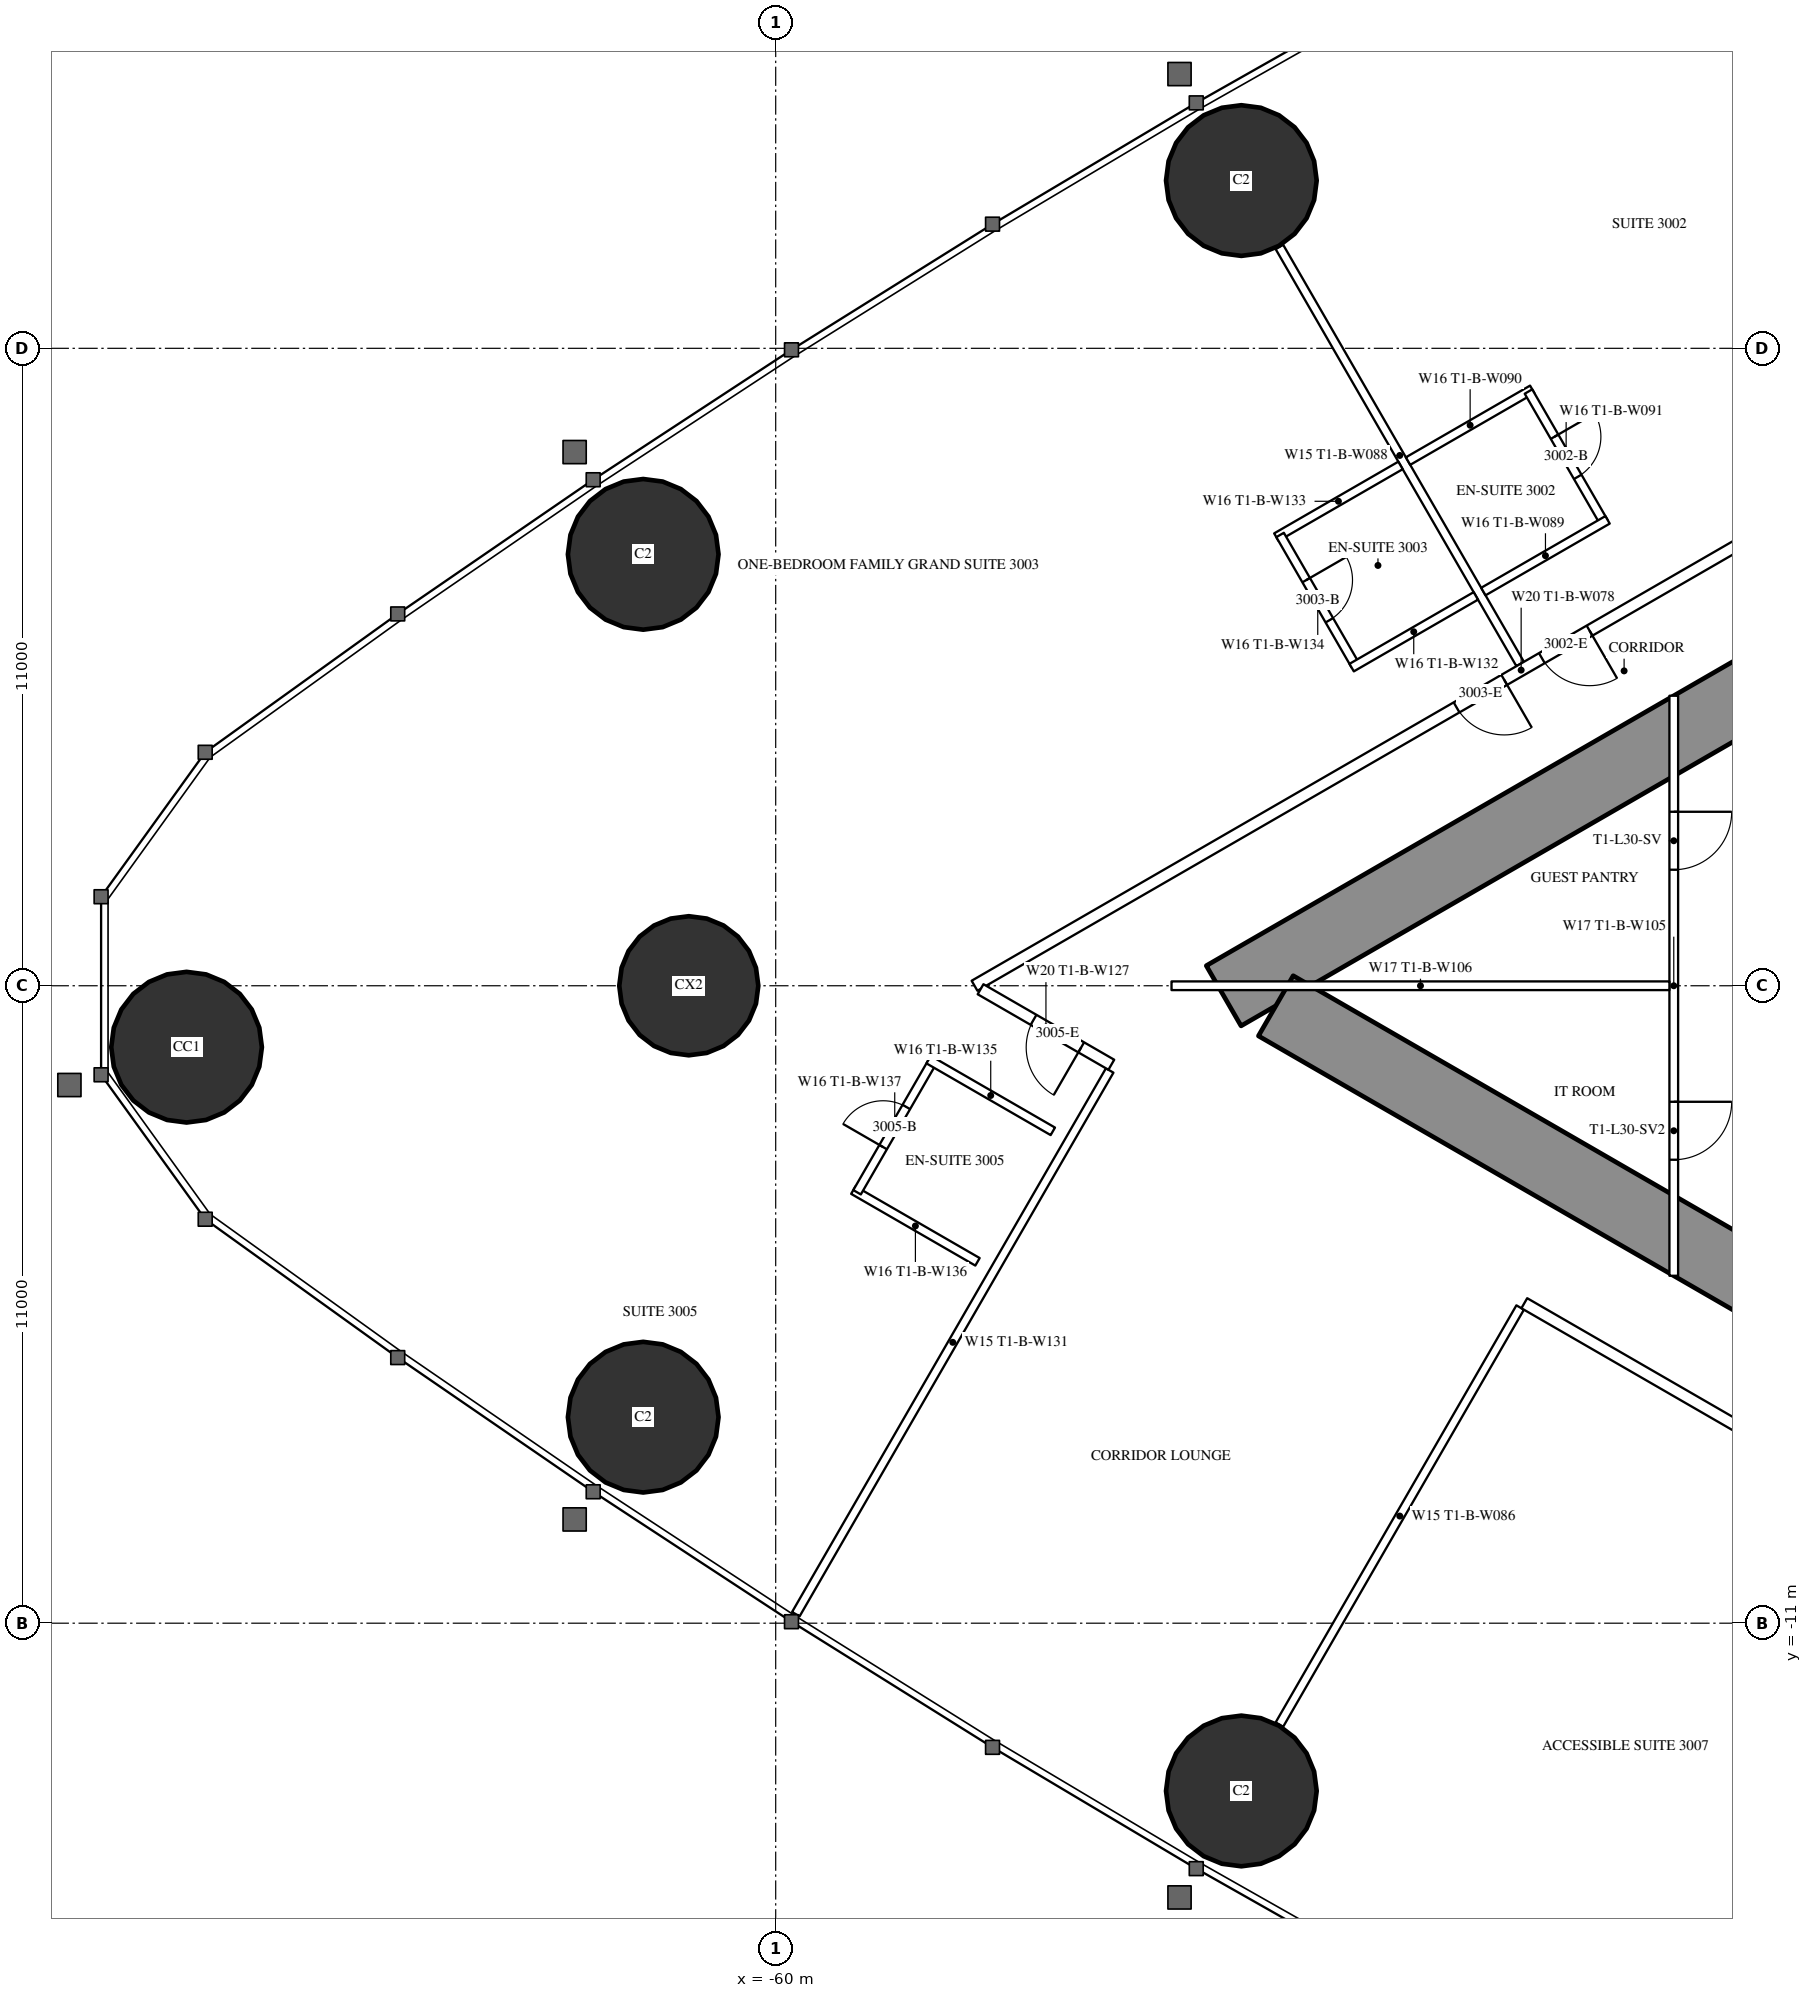
"""IFC4 building model, lengths in metres.
Left out: names, types, materials, properties, quantities, classifications, styles, units other than length and angle.
Written with IfcOpenShell. Run it as: python <this file> out.ifc"""

import sys

from ifc_helpers import new_model, si_unit, direction, frame, frame_2d, origin, origin_2d, place, context, subcontext, project, spatial, rectangle, circle, hollow_circle, extrude, element, fill, save


model = new_model("IFC4")
c1 = context("Model", 3, precision=1e-05, world=origin(), true_north=direction((0.0, 1.0)))
c2 = subcontext(c1, "Body", "Model", "MODEL_VIEW")
j1 = project(units=[si_unit("LENGTHUNIT", "METRE"), si_unit("PLANEANGLEUNIT", "RADIAN")], contexts=[c1])
p1 = place(None, origin())
s1 = spatial("IfcSite", under=j1, at=p1, CompositionType="ELEMENT")
p2 = place(p1, origin())
s2 = spatial("IfcBuilding", under=s1, at=p2, CompositionType="ELEMENT")
p3 = place(p2, frame((0.0, 0.0, 115.1)))
s3 = spatial("IfcBuildingStorey", under=s2, at=p3, CompositionType="ELEMENT", Elevation=115.1)
for number, where, z_axis, x_axis in (
    (1, (-70.168, -1.06, 0.0), (0.0, 0.0, 1.0), (1.0, 0.0, 0.0)),
    (2, (-62.287, -7.445, 0.0), (0.0, 0.0, 1.0), (1.0, 0.0, 0.0)),
    (3, (-51.963, -13.895, 0.0), (0.0, 0.0, 1.0), (1.0, 0.0, 0.0)),
    (4, (-51.963, 13.895, 0.0), (0.0, 0.0, 1.0), (1.0, 0.0, 0.0)),
    (5, (-62.287, 7.445, 0.0), (0.0, 0.0, 1.0), (1.0, 0.0, 0.0)),
):
    element("IfcColumn", number, at=place(p3, frame(where, z_axis=z_axis, x_axis=x_axis)), inside=s3, PredefinedType="COLUMN", context=c2, shape_type="SweptSolid", body=[
        extrude(hollow_circle(Radius=1.3, WallThickness=0.1, at=origin_2d()), origin(), (0.0, 0.0, 1.0), 3.5),
    ])
p4 = place(p3, frame((-61.5, 0.0, 0.0), z_axis=(0.0, 0.0, 1.0), x_axis=(1.0, 0.0, 0.0)))
e6 = element("IfcColumn", 6, at=p4, inside=s3, PredefinedType="COLUMN", context=c2, shape_type="SweptSolid", body=[
    extrude(circle(Radius=1.2, at=origin_2d()), origin(), (0.0, 0.0, 1.0), 3.5),
])
p5 = place(p3, frame((-27.2, 14.3, 0.0), z_axis=(0.0, 0.0, 1.0), x_axis=(-0.866026593062, -0.499997940104, 0.0)))
e7 = element("IfcWall", 7, at=p5, inside=s3, PredefinedType="SHEAR", context=c2, shape_type="SweptSolid", body=[
    extrude(rectangle(XDim=28.946, YDim=1.2, at=frame_2d((14.473, 0.0))), origin(), (0.0, 0.0, 1.0), 3.5),
])
p6 = place(p5, frame((4.6, 0.0, 0.0)))
e8 = element("IfcOpeningElement", 8, at=p6, cuts=e7, PredefinedType="OPENING", context=c2, shape_type="SweptSolid", body=[
    extrude(rectangle(XDim=1.0, YDim=2.2, at=frame_2d((0.5, 1.1))), frame((0.0, 0.61, 0.0), z_axis=(0.0, -1.0, 0.0), x_axis=(1.0, 0.0, 0.0)), (0.0, 0.0, 1.0), 1.22),
])
p7 = place(p5, frame((13.395, 0.0, 0.0)))
e9 = element("IfcOpeningElement", 9, at=p7, cuts=e7, PredefinedType="OPENING", context=c2, shape_type="SweptSolid", body=[
    extrude(rectangle(XDim=1.8, YDim=2.2, at=frame_2d((0.9, 1.1))), frame((0.0, 0.61, 0.0), z_axis=(0.0, -1.0, 0.0), x_axis=(1.0, 0.0, 0.0)), (0.0, 0.0, 1.0), 1.22),
])
p8 = place(p3, frame((-27.2, -14.3, 0.0), z_axis=(0.0, 0.0, 1.0), x_axis=(-0.866024021859, 0.500002393557, 0.0)))
e10 = element("IfcWall", 10, at=p8, inside=s3, PredefinedType="SHEAR", context=c2, shape_type="SweptSolid", body=[
    extrude(rectangle(XDim=27.907, YDim=1.2, at=frame_2d((13.954, 0.0))), origin(), (0.0, 0.0, 1.0), 3.5),
])
p9 = place(p8, frame((4.6, 0.0, 0.0)))
e11 = element("IfcOpeningElement", 11, at=p9, cuts=e10, PredefinedType="OPENING", context=c2, shape_type="SweptSolid", body=[
    extrude(rectangle(XDim=1.0, YDim=2.2, at=frame_2d((0.5, 1.1))), frame((0.0, 0.61, 0.0), z_axis=(0.0, -1.0, 0.0), x_axis=(1.0, 0.0, 0.0)), (0.0, 0.0, 1.0), 1.22),
])
p10 = place(p8, frame((13.395, 0.0, 0.0)))
e12 = element("IfcOpeningElement", 12, at=p10, cuts=e10, PredefinedType="OPENING", context=c2, shape_type="SweptSolid", body=[
    extrude(rectangle(XDim=1.8, YDim=2.2, at=frame_2d((0.9, 1.1))), frame((0.0, 0.61, 0.0), z_axis=(0.0, -1.0, 0.0), x_axis=(1.0, 0.0, 0.0)), (0.0, 0.0, 1.0), 1.22),
])
for number, where, z_axis, x_axis in (
    (13, (-47.151, 5.552, 0.0), (0.0, 0.0, 1.0), (-0.5, 0.866, 0.0)),
    (14, (-47.151, -5.552, 0.0), (0.0, 0.0, 1.0), (-0.5, -0.866, 0.0)),
):
    element("IfcWall", number, at=place(p3, frame(where, z_axis=z_axis, x_axis=x_axis)), inside=s3, PredefinedType="PARTITIONING", context=c2, shape_type="SweptSolid", body=[
        extrude(rectangle(XDim=8.311, YDim=0.15, at=frame_2d((4.156, 0.0))), origin(), (0.0, 0.0, 1.0), 2.2),
    ])
p11 = place(p3, frame((-54.236, -1.462, 0.0), z_axis=(0.0, 0.0, 1.0), x_axis=(-0.499990351854, -0.866030974073, 0.0)))
e15 = element("IfcWall", 15, at=p11, inside=s3, PredefinedType="PARTITIONING", context=c2, shape_type="SweptSolid", body=[
    extrude(rectangle(XDim=10.834, YDim=0.15, at=frame_2d((5.417, 0.0))), origin(), (0.0, 0.0, 1.0), 3.25),
])
p12 = place(p3, frame((-37.7, 10.894, 0.0), z_axis=(0.0, 0.0, 1.0), x_axis=(-0.866027905338, -0.499995667157, 0.0)))
e16 = element("IfcWall", 16, at=p12, inside=s3, PredefinedType="PARTITIONING", context=c2, shape_type="SweptSolid", body=[
    extrude(rectangle(XDim=21.787, YDim=0.2, at=frame_2d((10.894, 0.0))), origin(), (0.0, 0.0, 1.0), 3.25),
])
p13 = place(p12, frame((11.23, 0.0, 0.0)))
e17 = element("IfcOpeningElement", 17, at=p13, cuts=e16, PredefinedType="OPENING", context=c2, shape_type="SweptSolid", body=[
    extrude(rectangle(XDim=0.95, YDim=2.2, at=frame_2d((0.475, 1.1))), frame((0.0, 0.11, 0.0), z_axis=(0.0, -1.0, 0.0), x_axis=(1.0, 0.0, 0.0)), (0.0, 0.0, 1.0), 0.22),
])
p14 = place(p12, frame((9.531, 0.0, 0.0)))
e18 = element("IfcOpeningElement", 18, at=p14, cuts=e16, PredefinedType="OPENING", context=c2, shape_type="SweptSolid", body=[
    extrude(rectangle(XDim=0.95, YDim=2.2, at=frame_2d((0.475, 1.1))), frame((0.0, 0.11, 0.0), z_axis=(0.0, -1.0, 0.0), x_axis=(1.0, 0.0, 0.0)), (0.0, 0.0, 1.0), 0.22),
])
p15 = place(p3, frame((-36.92, -11.344, 0.0), z_axis=(0.0, 0.0, 1.0), x_axis=(-0.866027897759, 0.499995680284, 0.0)))
e19 = element("IfcWall", 19, at=p15, inside=s3, PredefinedType="PARTITIONING", context=c2, shape_type="SweptSolid", body=[
    extrude(rectangle(XDim=11.731, YDim=0.2, at=frame_2d((5.865, 0.0))), origin(), (0.0, 0.0, 1.0), 3.25),
])
p16 = place(p15, frame((3.35, 0.0, 0.0)))
e20 = element("IfcOpeningElement", 20, at=p16, cuts=e19, PredefinedType="OPENING", context=c2, shape_type="SweptSolid", body=[
    extrude(rectangle(XDim=1.0, YDim=2.2, at=frame_2d((0.5, 1.1))), frame((0.0, 0.11, 0.0), z_axis=(0.0, -1.0, 0.0), x_axis=(1.0, 0.0, 0.0)), (0.0, 0.0, 1.0), 0.22),
])
p17 = place(p3, frame((-54.207, -1.363, 0.0), z_axis=(0.0, 0.0, 1.0), x_axis=(-0.866049872286, 0.499957616916, 0.0)))
e21 = element("IfcWall", 21, at=p17, inside=s3, PredefinedType="PARTITIONING", context=c2, shape_type="SweptSolid", body=[
    extrude(rectangle(XDim=2.606, YDim=0.2, at=frame_2d((1.303, 0.0))), origin(), (0.0, 0.0, 1.0), 3.25),
])
p18 = place(p17, frame((0.6, 0.0, 0.0)))
e22 = element("IfcOpeningElement", 22, at=p18, cuts=e21, PredefinedType="OPENING", context=c2, shape_type="SweptSolid", body=[
    extrude(rectangle(XDim=0.95, YDim=2.2, at=frame_2d((0.475, 1.1))), frame((0.0, 0.11, 0.0), z_axis=(0.0, -1.0, 0.0), x_axis=(1.0, 0.0, 0.0)), (0.0, 0.0, 1.0), 0.22),
])
p19 = place(p3, frame((-49.216, 8.979, 0.0), z_axis=(0.0, 0.0, 1.0), x_axis=(-0.866031185235, -0.4999899861, 0.0)))
e23 = element("IfcWall", 23, at=p19, inside=s3, PredefinedType="PARTITIONING", context=c2, shape_type="SweptSolid", body=[
    extrude(rectangle(XDim=2.475, YDim=0.15, at=frame_2d((1.238, 0.0))), origin(), (0.0, 0.0, 1.0), 3.25),
])
p20 = place(p3, frame((-49.995, 5.527, 0.0), z_axis=(0.0, 0.0, 1.0), x_axis=(-0.500006934395, 0.866021400173, 0.0)))
e24 = element("IfcWall", 24, at=p20, inside=s3, PredefinedType="PARTITIONING", context=c2, shape_type="SweptSolid", body=[
    extrude(rectangle(XDim=2.6, YDim=0.15, at=frame_2d((1.3, 0.0))), origin(), (0.0, 0.0, 1.0), 3.25),
])
p21 = place(p20, frame((0.9, 0.0, 0.0)))
e25 = element("IfcOpeningElement", 25, at=p21, cuts=e24, PredefinedType="OPENING", context=c2, shape_type="SweptSolid", body=[
    extrude(rectangle(XDim=0.8, YDim=2.2, at=frame_2d((0.4, 1.1))), frame((0.0, 0.085, 0.0), z_axis=(0.0, -1.0, 0.0), x_axis=(1.0, 0.0, 0.0)), (0.0, 0.0, 1.0), 0.17),
])
for number, where, z_axis, x_axis in (
    (26, (-47.916, 6.727, 0.0), (0.0, 0.0, 1.0), (-0.866, -0.5, 0.0)),
    (27, (-56.517, -4.764, 0.0), (0.0, 0.0, 1.0), (-0.866, 0.5, 0.0)),
):
    element("IfcWall", number, at=place(p3, frame(where, z_axis=z_axis, x_axis=x_axis)), inside=s3, PredefinedType="PARTITIONING", context=c2, shape_type="SweptSolid", body=[
        extrude(rectangle(XDim=2.475, YDim=0.15, at=frame_2d((1.238, 0.0))), origin(), (0.0, 0.0, 1.0), 3.25),
    ])
p22 = place(p3, frame((-57.296, -1.312, 0.0), z_axis=(0.0, 0.0, 1.0), x_axis=(-0.49997716683, -0.86603858612, 0.0)))
e28 = element("IfcWall", 28, at=p22, inside=s3, PredefinedType="PARTITIONING", context=c2, shape_type="SweptSolid", body=[
    extrude(rectangle(XDim=2.6, YDim=0.15, at=frame_2d((1.3, 0.0))), origin(), (0.0, 0.0, 1.0), 3.25),
])
p23 = place(p22, frame((0.9, 0.0, 0.0)))
e29 = element("IfcOpeningElement", 29, at=p23, cuts=e28, PredefinedType="OPENING", context=c2, shape_type="SweptSolid", body=[
    extrude(rectangle(XDim=0.8, YDim=2.2, at=frame_2d((0.4, 1.1))), frame((0.0, 0.085, 0.0), z_axis=(0.0, -1.0, 0.0), x_axis=(1.0, 0.0, 0.0)), (0.0, 0.0, 1.0), 0.17),
])
p24 = place(p3, frame((-55.217, -2.512, 0.0), z_axis=(0.0, 0.0, 1.0), x_axis=(-0.866031185235, 0.4999899861, 0.0)))
e30 = element("IfcWall", 30, at=p24, inside=s3, PredefinedType="PARTITIONING", context=c2, shape_type="SweptSolid", body=[
    extrude(rectangle(XDim=2.475, YDim=0.15, at=frame_2d((1.238, 0.0))), origin(), (0.0, 0.0, 1.0), 3.25),
])
p25 = place(p3, frame((-46.943, 10.292, 0.0), z_axis=(0.0, 0.0, 1.0), x_axis=(-0.866006523861, -0.500032699561, 0.0)))
e31 = element("IfcWall", 31, at=p25, inside=s3, PredefinedType="PARTITIONING", context=c2, shape_type="SweptSolid", body=[
    extrude(rectangle(XDim=2.475, YDim=0.15, at=frame_2d((1.237, 0.0))), origin(), (0.0, 0.0, 1.0), 3.25),
])
p26 = place(p3, frame((-45.708, 8.002, 0.0), z_axis=(0.0, 0.0, 1.0), x_axis=(-0.500047596559, 0.865997922154, 0.0)))
e32 = element("IfcWall", 32, at=p26, inside=s3, PredefinedType="PARTITIONING", context=c2, shape_type="SweptSolid", body=[
    extrude(rectangle(XDim=2.6, YDim=0.15, at=frame_2d((1.3, 0.0))), origin(), (0.0, 0.0, 1.0), 3.25),
])
p27 = place(p26, frame((0.9, 0.0, 0.0)))
e33 = element("IfcOpeningElement", 33, at=p27, cuts=e32, PredefinedType="OPENING", context=c2, shape_type="SweptSolid", body=[
    extrude(rectangle(XDim=0.8, YDim=2.2, at=frame_2d((0.4, 1.1))), frame((0.0, 0.085, 0.0), z_axis=(0.0, -1.0, 0.0), x_axis=(1.0, 0.0, 0.0)), (0.0, 0.0, 1.0), 0.17),
])
p28 = place(p3, frame((-45.643, 8.04, 0.0), z_axis=(0.0, 0.0, 1.0), x_axis=(-0.866006523861, -0.500032699561, 0.0)))
e34 = element("IfcWall", 34, at=p28, inside=s3, PredefinedType="PARTITIONING", context=c2, shape_type="SweptSolid", body=[
    extrude(rectangle(XDim=2.475, YDim=0.15, at=frame_2d((1.237, 0.0))), origin(), (0.0, 0.0, 1.0), 3.25),
])
p29 = place(p3, frame((-44.5, 5.005, 0.0), z_axis=(0.0, 0.0, 1.0), x_axis=(0.0, -1.0, 0.0)))
e35 = element("IfcWall", 35, at=p29, inside=s3, PredefinedType="PARTITIONING", context=c2, shape_type="SweptSolid", body=[
    extrude(rectangle(XDim=10.009, YDim=0.15, at=frame_2d((5.005, 0.0))), origin(), (0.0, 0.0, 1.0), 2.45),
])
p30 = place(p29, frame((2.002, 0.0, 0.0)))
e36 = element("IfcOpeningElement", 36, at=p30, cuts=e35, PredefinedType="OPENING", context=c2, shape_type="SweptSolid", body=[
    extrude(rectangle(XDim=1.0, YDim=2.2, at=frame_2d((0.5, 1.1))), frame((0.0, 0.085, 0.0), z_axis=(0.0, -1.0, 0.0), x_axis=(1.0, 0.0, 0.0)), (0.0, 0.0, 1.0), 0.17),
])
p31 = place(p29, frame((7.007, 0.0, 0.0)))
e37 = element("IfcOpeningElement", 37, at=p31, cuts=e35, PredefinedType="OPENING", context=c2, shape_type="SweptSolid", body=[
    extrude(rectangle(XDim=1.0, YDim=2.2, at=frame_2d((0.5, 1.1))), frame((0.0, 0.085, 0.0), z_axis=(0.0, -1.0, 0.0), x_axis=(1.0, 0.0, 0.0)), (0.0, 0.0, 1.0), 0.17),
])
p32 = place(p3, frame((-44.575, 0.0, 0.0), z_axis=(0.0, 0.0, 1.0), x_axis=(-1.0, 0.0, 0.0)))
e38 = element("IfcWall", 38, at=p32, inside=s3, PredefinedType="PARTITIONING", context=c2, shape_type="SweptSolid", body=[
    extrude(rectangle(XDim=8.593, YDim=0.15, at=frame_2d((4.297, 0.0))), origin(), (0.0, 0.0, 1.0), 2.2),
])
p33 = place(p21, origin())
e39 = element("IfcDoor", 39, at=p33, inside=s3, OperationType="SINGLE_SWING_RIGHT", PredefinedType="DOOR", context=c2, shape_type="SweptSolid", body=[
    extrude(rectangle(XDim=0.8, YDim=2.2, at=frame_2d((0.4, 1.1))), frame((0.0, 0.025, 0.0), z_axis=(0.0, -1.0, 0.0), x_axis=(1.0, 0.0, 0.0)), (0.0, 0.0, 1.0), 0.05),
])
fill(e25, e39)
p34 = place(p13, origin())
e40 = element("IfcDoor", 40, at=p34, inside=s3, OperationType="SINGLE_SWING_LEFT", PredefinedType="DOOR", context=c2, shape_type="SweptSolid", body=[
    extrude(rectangle(XDim=0.95, YDim=2.2, at=frame_2d((0.475, 1.1))), frame((0.0, 0.025, 0.0), z_axis=(0.0, -1.0, 0.0), x_axis=(1.0, 0.0, 0.0)), (0.0, 0.0, 1.0), 0.05),
])
fill(e17, e40)
p35 = place(p23, origin())
e41 = element("IfcDoor", 41, at=p35, inside=s3, OperationType="SINGLE_SWING_RIGHT", PredefinedType="DOOR", context=c2, shape_type="SweptSolid", body=[
    extrude(rectangle(XDim=0.8, YDim=2.2, at=frame_2d((0.4, 1.1))), frame((0.0, 0.025, 0.0), z_axis=(0.0, -1.0, 0.0), x_axis=(1.0, 0.0, 0.0)), (0.0, 0.0, 1.0), 0.05),
])
fill(e29, e41)
p36 = place(p18, origin())
e42 = element("IfcDoor", 42, at=p36, inside=s3, OperationType="SINGLE_SWING_LEFT", PredefinedType="DOOR", context=c2, shape_type="SweptSolid", body=[
    extrude(rectangle(XDim=0.95, YDim=2.2, at=frame_2d((0.475, 1.1))), frame((0.0, 0.025, 0.0), z_axis=(0.0, -1.0, 0.0), x_axis=(1.0, 0.0, 0.0)), (0.0, 0.0, 1.0), 0.05),
])
fill(e22, e42)
p37 = place(p27, origin())
e43 = element("IfcDoor", 43, at=p37, inside=s3, OperationType="SINGLE_SWING_RIGHT", PredefinedType="DOOR", context=c2, shape_type="SweptSolid", body=[
    extrude(rectangle(XDim=0.8, YDim=2.2, at=frame_2d((0.4, 1.1))), frame((0.0, 0.025, 0.0), z_axis=(0.0, -1.0, 0.0), x_axis=(1.0, 0.0, 0.0)), (0.0, 0.0, 1.0), 0.05),
])
fill(e33, e43)
p38 = place(p14, origin())
e44 = element("IfcDoor", 44, at=p38, inside=s3, OperationType="SINGLE_SWING_LEFT", PredefinedType="DOOR", context=c2, shape_type="SweptSolid", body=[
    extrude(rectangle(XDim=0.95, YDim=2.2, at=frame_2d((0.475, 1.1))), frame((0.0, 0.025, 0.0), z_axis=(0.0, -1.0, 0.0), x_axis=(1.0, 0.0, 0.0)), (0.0, 0.0, 1.0), 0.05),
])
fill(e18, e44)
p39 = place(p30, origin())
e45 = element("IfcDoor", 45, at=p39, inside=s3, OperationType="SINGLE_SWING_LEFT", PredefinedType="DOOR", context=c2, shape_type="SweptSolid", body=[
    extrude(rectangle(XDim=1.0, YDim=2.2, at=frame_2d((0.5, 1.1))), frame((0.0, 0.025, 0.0), z_axis=(0.0, -1.0, 0.0), x_axis=(1.0, 0.0, 0.0)), (0.0, 0.0, 1.0), 0.05),
])
fill(e36, e45)
p40 = place(p31, origin())
e46 = element("IfcDoor", 46, at=p40, inside=s3, OperationType="SINGLE_SWING_LEFT", PredefinedType="DOOR", context=c2, shape_type="SweptSolid", body=[
    extrude(rectangle(XDim=1.0, YDim=2.2, at=frame_2d((0.5, 1.1))), frame((0.0, 0.025, 0.0), z_axis=(0.0, -1.0, 0.0), x_axis=(1.0, 0.0, 0.0)), (0.0, 0.0, 1.0), 0.05),
])
fill(e37, e46)
save(model, sys.argv[1])
